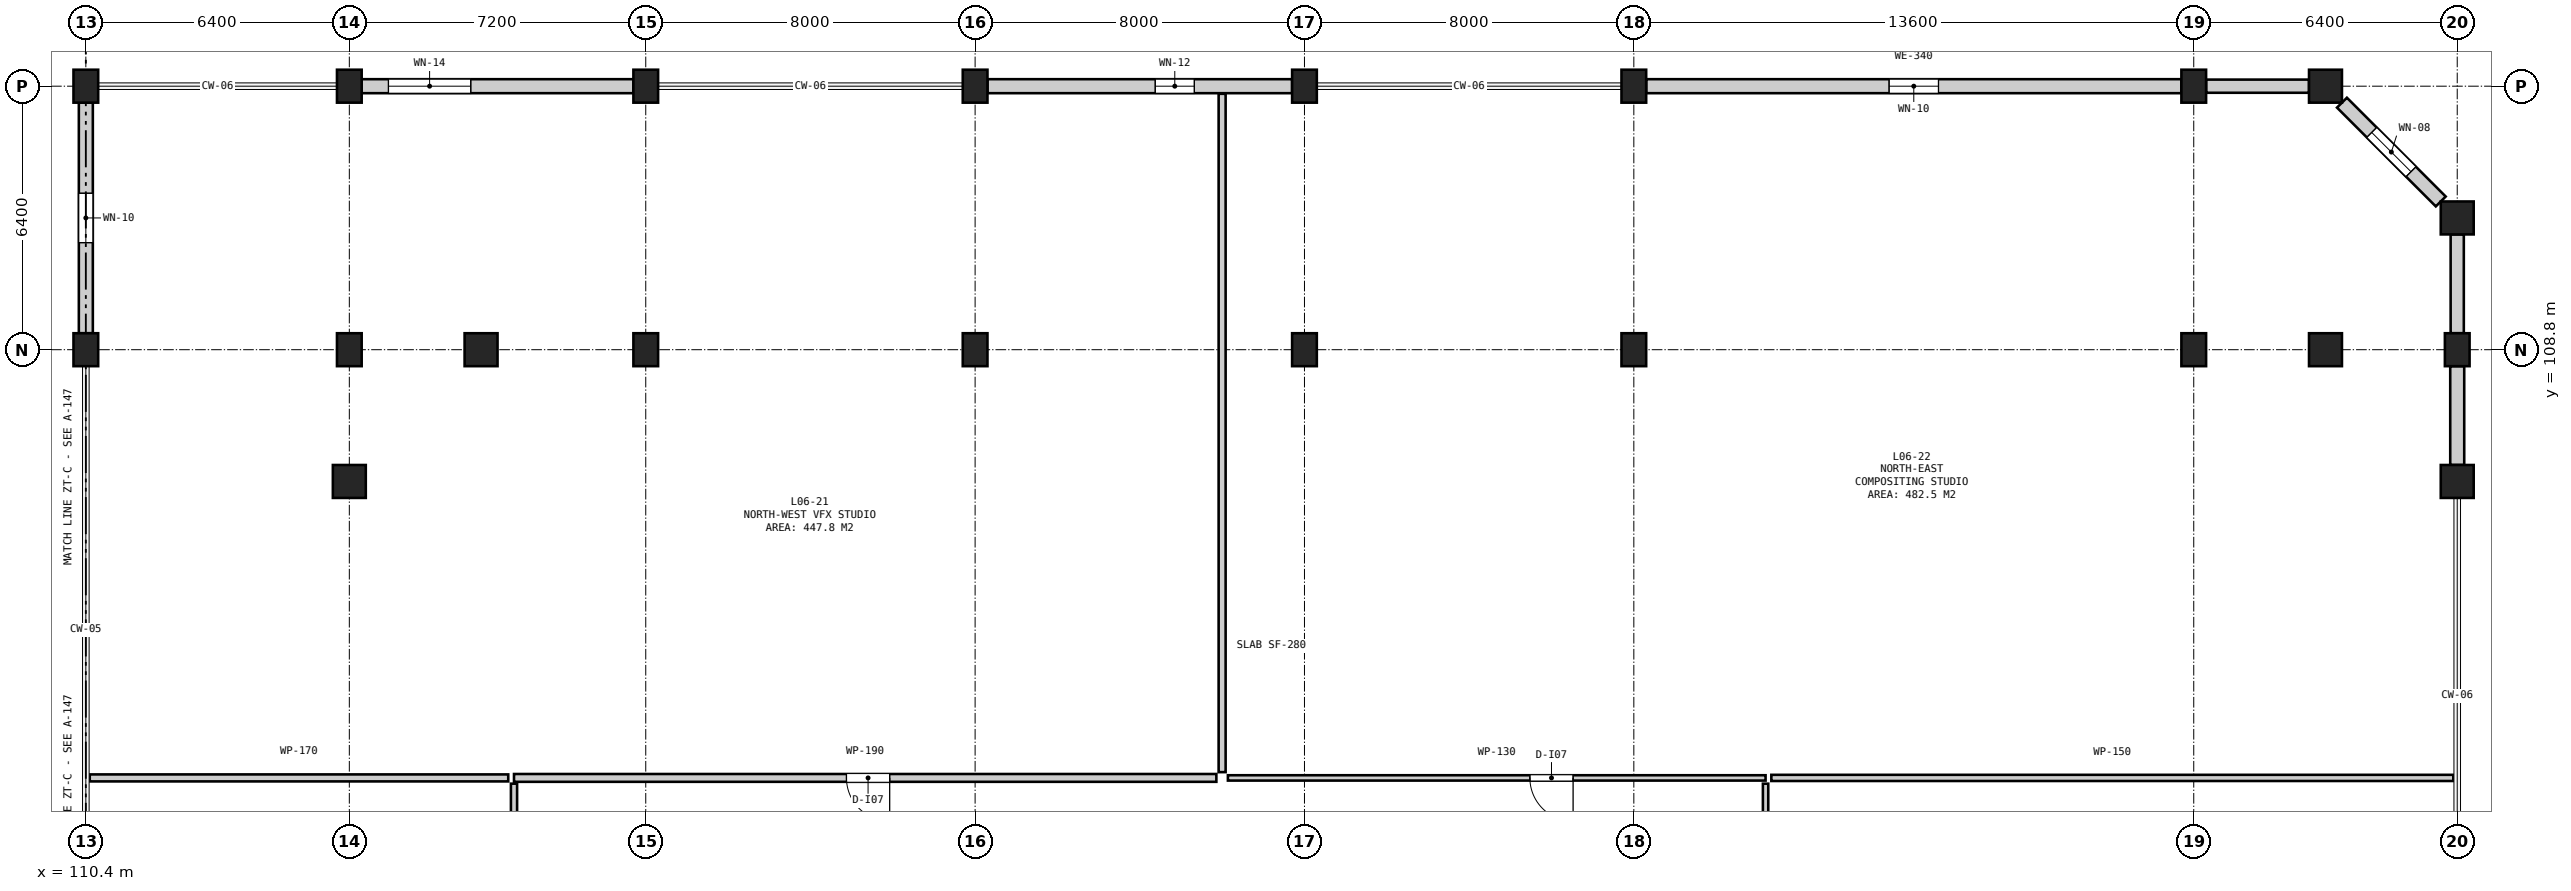
"""IFC4 building model, lengths in metres.
Left out: names, types, materials, properties, quantities, classifications, styles, units other than length and angle.
Written with IfcOpenShell. Run it as: python <this file> out.ifc"""

import sys

from ifc_helpers import new_model, si_unit, direction, frame, frame_2d, origin, origin_2d, place, context, subcontext, project, spatial, rectangle, circle, extrude, element, fill, save


model = new_model("IFC4")
c1 = context("Model", 3, precision=1e-05, world=origin(), true_north=direction((0.0, 1.0)))
c2 = subcontext(c1, "Body", "Model", "MODEL_VIEW")
j1 = project(units=[si_unit("LENGTHUNIT", "METRE"), si_unit("PLANEANGLEUNIT", "RADIAN")], contexts=[c1])
p1 = place(None, origin())
s1 = spatial("IfcSite", under=j1, at=p1, CompositionType="ELEMENT")
p2 = place(p1, origin())
s2 = spatial("IfcBuilding", under=s1, at=p2, CompositionType="ELEMENT")
p3 = place(p2, frame((0.0, 0.0, 27.8)))
s3 = spatial("IfcBuildingStorey", under=s2, at=p3, CompositionType="ELEMENT", Elevation=27.8)
for number, where, z_axis, x_axis in (
    (1, (110.4, 108.8, 0.0), (0.0, 0.0, 1.0), (1.0, 0.0, 0.0)),
    (2, (110.4, 115.2, 0.0), (0.0, 0.0, 1.0), (1.0, 0.0, 0.0)),
):
    element("IfcColumn", number, at=place(p3, frame(where, z_axis=z_axis, x_axis=x_axis)), inside=s3, PredefinedType="COLUMN", context=c2, shape_type="SweptSolid", body=[
        extrude(rectangle(XDim=0.6, YDim=0.8, at=origin_2d()), origin(), (0.0, 0.0, 1.0), 3.9),
    ])
p4 = place(p3, frame((116.8, 105.6, 0.0), z_axis=(0.0, 0.0, 1.0), x_axis=(1.0, 0.0, 0.0)))
e3 = element("IfcColumn", 3, at=p4, inside=s3, PredefinedType="COLUMN", context=c2, shape_type="SweptSolid", body=[
    extrude(circle(Radius=0.4, at=origin_2d()), origin(), (0.0, 0.0, 1.0), 3.9),
])
for number, where, z_axis, x_axis in (
    (4, (116.8, 108.8, 0.0), (0.0, 0.0, 1.0), (1.0, 0.0, 0.0)),
    (5, (116.8, 115.2, 0.0), (0.0, 0.0, 1.0), (1.0, 0.0, 0.0)),
):
    element("IfcColumn", number, at=place(p3, frame(where, z_axis=z_axis, x_axis=x_axis)), inside=s3, PredefinedType="COLUMN", context=c2, shape_type="SweptSolid", body=[
        extrude(rectangle(XDim=0.6, YDim=0.8, at=origin_2d()), origin(), (0.0, 0.0, 1.0), 3.9),
    ])
p5 = place(p3, frame((120.0, 108.8, 0.0), z_axis=(0.0, 0.0, 1.0), x_axis=(1.0, 0.0, 0.0)))
e6 = element("IfcColumn", 6, at=p5, inside=s3, PredefinedType="COLUMN", context=c2, shape_type="SweptSolid", body=[
    extrude(circle(Radius=0.4, at=origin_2d()), origin(), (0.0, 0.0, 1.0), 3.9),
])
for number, where, z_axis, x_axis in (
    (7, (124.0, 108.8, 0.0), (0.0, 0.0, 1.0), (1.0, 0.0, 0.0)),
    (8, (124.0, 115.2, 0.0), (0.0, 0.0, 1.0), (1.0, 0.0, 0.0)),
    (9, (132.0, 108.8, 0.0), (0.0, 0.0, 1.0), (1.0, 0.0, 0.0)),
    (10, (132.0, 115.2, 0.0), (0.0, 0.0, 1.0), (1.0, 0.0, 0.0)),
    (11, (140.0, 108.8, 0.0), (0.0, 0.0, 1.0), (1.0, 0.0, 0.0)),
    (12, (140.0, 115.2, 0.0), (0.0, 0.0, 1.0), (1.0, 0.0, 0.0)),
    (13, (148.0, 108.8, 0.0), (0.0, 0.0, 1.0), (1.0, 0.0, 0.0)),
    (14, (148.0, 115.2, 0.0), (0.0, 0.0, 1.0), (1.0, 0.0, 0.0)),
    (15, (161.6, 108.8, 0.0), (0.0, 0.0, 1.0), (1.0, 0.0, 0.0)),
    (16, (161.6, 115.2, 0.0), (0.0, 0.0, 1.0), (1.0, 0.0, 0.0)),
):
    element("IfcColumn", number, at=place(p3, frame(where, z_axis=z_axis, x_axis=x_axis)), inside=s3, PredefinedType="COLUMN", context=c2, shape_type="SweptSolid", body=[
        extrude(rectangle(XDim=0.6, YDim=0.8, at=origin_2d()), origin(), (0.0, 0.0, 1.0), 3.9),
    ])
for number, where, z_axis, x_axis in (
    (17, (164.8, 108.8, 0.0), (0.0, 0.0, 1.0), (1.0, 0.0, 0.0)),
    (18, (164.8, 115.2, 0.0), (0.0, 0.0, 1.0), (1.0, 0.0, 0.0)),
    (19, (168.0, 105.6, 0.0), (0.0, 0.0, 1.0), (1.0, 0.0, 0.0)),
):
    element("IfcColumn", number, at=place(p3, frame(where, z_axis=z_axis, x_axis=x_axis)), inside=s3, PredefinedType="COLUMN", context=c2, shape_type="SweptSolid", body=[
        extrude(circle(Radius=0.4, at=origin_2d()), origin(), (0.0, 0.0, 1.0), 3.9),
    ])
p6 = place(p3, frame((168.0, 108.8, 0.0), z_axis=(0.0, 0.0, 1.0), x_axis=(1.0, 0.0, 0.0)))
e20 = element("IfcColumn", 20, at=p6, inside=s3, PredefinedType="COLUMN", context=c2, shape_type="SweptSolid", body=[
    extrude(rectangle(XDim=0.6, YDim=0.8, at=origin_2d()), origin(), (0.0, 0.0, 1.0), 3.9),
])
p7 = place(p3, frame((168.0, 112.0, 0.0), z_axis=(0.0, 0.0, 1.0), x_axis=(1.0, 0.0, 0.0)))
e21 = element("IfcColumn", 21, at=p7, inside=s3, PredefinedType="COLUMN", context=c2, shape_type="SweptSolid", body=[
    extrude(circle(Radius=0.4, at=origin_2d()), origin(), (0.0, 0.0, 1.0), 3.9),
])
p8 = place(p3, frame((168.0, 106.0, 0.0), z_axis=(0.0, 0.0, 1.0), x_axis=(0.0, 1.0, 0.0)))
e22 = element("IfcWall", 22, at=p8, inside=s3, PredefinedType="SOLIDWALL", context=c2, shape_type="SweptSolid", body=[
    extrude(rectangle(XDim=2.4, YDim=0.34, at=frame_2d((1.2, 0.0))), origin(), (0.0, 0.0, 1.0), 2.575),
])
p9 = place(p3, frame((168.0, 109.2, 0.0), z_axis=(0.0, 0.0, 1.0), x_axis=(0.0, 1.0, 0.0)))
e23 = element("IfcWall", 23, at=p9, inside=s3, PredefinedType="SOLIDWALL", context=c2, shape_type="SweptSolid", body=[
    extrude(rectangle(XDim=2.4, YDim=0.32, at=frame_2d((1.2, 0.0))), origin(), (0.0, 0.0, 1.0), 3.04),
])
p10 = place(p3, frame((167.6, 112.4, 0.0), z_axis=(0.0, 0.0, 1.0), x_axis=(-0.707106781187, 0.707106781187, 0.0)))
e24 = element("IfcWall", 24, at=p10, inside=s3, PredefinedType="SOLIDWALL", context=c2, shape_type="SweptSolid", body=[
    extrude(rectangle(XDim=3.394, YDim=0.34, at=frame_2d((1.697, 0.0))), origin(), (0.0, 0.0, 1.0), 3.035),
])
p11 = place(p10, frame((1.022, 0.0, 0.9)))
e25 = element("IfcOpeningElement", 25, at=p11, cuts=e24, PredefinedType="OPENING", context=c2, shape_type="SweptSolid", body=[
    extrude(rectangle(XDim=1.35, YDim=1.75, at=frame_2d((0.675, 0.875))), frame((0.0, 0.182, 0.0), z_axis=(0.0, -1.0, 0.0), x_axis=(1.0, 0.0, 0.0)), (0.0, 0.0, 1.0), 0.364),
])
p12 = place(p3, frame((164.4, 115.2, 0.0), z_axis=(0.0, 0.0, 1.0), x_axis=(-1.0, 0.0, 0.0)))
e26 = element("IfcWall", 26, at=p12, inside=s3, PredefinedType="SOLIDWALL", context=c2, shape_type="SweptSolid", body=[
    extrude(rectangle(XDim=2.5, YDim=0.32, at=frame_2d((1.25, 0.0))), origin(), (0.0, 0.0, 1.0), 3.04),
])
p13 = place(p3, frame((161.3, 115.2, 0.0), z_axis=(0.0, 0.0, 1.0), x_axis=(-1.0, 0.0, 0.0)))
e27 = element("IfcWall", 27, at=p13, inside=s3, PredefinedType="SOLIDWALL", context=c2, shape_type="SweptSolid", body=[
    extrude(rectangle(XDim=13.0, YDim=0.34, at=frame_2d((6.5, 0.0))), origin(), (0.0, 0.0, 1.0), 3.025),
])
p14 = place(p13, frame((5.9, 0.0, 0.9)))
e28 = element("IfcOpeningElement", 28, at=p14, cuts=e27, PredefinedType="OPENING", context=c2, shape_type="SweptSolid", body=[
    extrude(rectangle(XDim=1.2, YDim=1.7, at=frame_2d((0.6, 0.85))), frame((0.0, 0.182, 0.0), z_axis=(0.0, -1.0, 0.0), x_axis=(1.0, 0.0, 0.0)), (0.0, 0.0, 1.0), 0.364),
])
p15 = place(p3, frame((139.7, 115.2, 0.0), z_axis=(0.0, 0.0, 1.0), x_axis=(-1.0, 0.0, 0.0)))
e29 = element("IfcWall", 29, at=p15, inside=s3, PredefinedType="SOLIDWALL", context=c2, shape_type="SweptSolid", body=[
    extrude(rectangle(XDim=7.4, YDim=0.34, at=frame_2d((3.7, 0.0))), origin(), (0.0, 0.0, 1.0), 3.04),
])
p16 = place(p15, frame((2.375, 0.0, 0.9)))
e30 = element("IfcOpeningElement", 30, at=p16, cuts=e29, PredefinedType="OPENING", context=c2, shape_type="SweptSolid", body=[
    extrude(rectangle(XDim=0.95, YDim=1.45, at=frame_2d((0.475, 0.725))), frame((0.0, 0.182, 0.0), z_axis=(0.0, -1.0, 0.0), x_axis=(1.0, 0.0, 0.0)), (0.0, 0.0, 1.0), 0.364),
])
p17 = place(p3, frame((123.7, 115.2, 0.0), z_axis=(0.0, 0.0, 1.0), x_axis=(-1.0, 0.0, 0.0)))
e31 = element("IfcWall", 31, at=p17, inside=s3, PredefinedType="SOLIDWALL", context=c2, shape_type="SweptSolid", body=[
    extrude(rectangle(XDim=6.6, YDim=0.34, at=frame_2d((3.3, 0.0))), origin(), (0.0, 0.0, 1.0), 3.025),
])
p18 = place(p17, frame((3.95, 0.0, 0.9)))
e32 = element("IfcOpeningElement", 32, at=p18, cuts=e31, PredefinedType="OPENING", context=c2, shape_type="SweptSolid", body=[
    extrude(rectangle(XDim=2.0, YDim=1.65, at=frame_2d((1.0, 0.825))), frame((0.0, 0.182, 0.0), z_axis=(0.0, -1.0, 0.0), x_axis=(1.0, 0.0, 0.0)), (0.0, 0.0, 1.0), 0.364),
])
p19 = place(p3, frame((110.4, 114.8, 0.0), z_axis=(0.0, 0.0, 1.0), x_axis=(0.0, -1.0, 0.0)))
e33 = element("IfcWall", 33, at=p19, inside=s3, PredefinedType="SOLIDWALL", context=c2, shape_type="SweptSolid", body=[
    extrude(rectangle(XDim=5.6, YDim=0.34, at=frame_2d((2.8, 0.0))), origin(), (0.0, 0.0, 1.0), 3.025),
])
p20 = place(p19, frame((2.2, 0.0, 0.9)))
e34 = element("IfcOpeningElement", 34, at=p20, cuts=e33, PredefinedType="OPENING", context=c2, shape_type="SweptSolid", body=[
    extrude(rectangle(XDim=1.2, YDim=1.7, at=frame_2d((0.6, 0.85))), frame((0.0, 0.182, 0.0), z_axis=(0.0, -1.0, 0.0), x_axis=(1.0, 0.0, 0.0)), (0.0, 0.0, 1.0), 0.364),
])
p21 = place(p3, frame((110.495, 98.4, 0.0), z_axis=(0.0, 0.0, 1.0), x_axis=(1.0, 0.0, 0.0)))
e35 = element("IfcWall", 35, at=p21, inside=s3, PredefinedType="PARTITIONING", context=c2, shape_type="SweptSolid", body=[
    extrude(rectangle(XDim=10.165, YDim=0.17, at=frame_2d((5.083, 0.0))), origin(), (0.0, 0.0, 1.0), 3.62),
])
p22 = place(p3, frame((120.8, 76.14, 0.0), z_axis=(0.0, 0.0, 1.0), x_axis=(0.0, 1.0, 0.0)))
e36 = element("IfcWall", 36, at=p22, inside=s3, PredefinedType="PARTITIONING", context=c2, shape_type="SweptSolid", body=[
    extrude(rectangle(XDim=22.12, YDim=0.15, at=frame_2d((11.06, 0.0))), origin(), (0.0, 0.0, 1.0), 3.62),
])
p23 = place(p22, frame((10.535, 0.0, 0.0)))
e37 = element("IfcOpeningElement", 37, at=p23, cuts=e36, PredefinedType="OPENING", context=c2, shape_type="SweptSolid", body=[
    extrude(rectangle(XDim=1.05, YDim=2.15, at=frame_2d((0.525, 1.075))), frame((0.0, 0.087, 0.0), z_axis=(0.0, -1.0, 0.0), x_axis=(1.0, 0.0, 0.0)), (0.0, 0.0, 1.0), 0.174),
])
p24 = place(p3, frame((151.34, 98.4, 0.0), z_axis=(0.0, 0.0, 1.0), x_axis=(1.0, 0.0, 0.0)))
e38 = element("IfcWall", 38, at=p24, inside=s3, PredefinedType="PARTITIONING", context=c2, shape_type="SweptSolid", body=[
    extrude(rectangle(XDim=16.565, YDim=0.15, at=frame_2d((8.282, 0.0))), origin(), (0.0, 0.0, 1.0), 3.62),
])
p25 = place(p3, frame((151.2, 76.14, 0.0), z_axis=(0.0, 0.0, 1.0), x_axis=(0.0, 1.0, 0.0)))
e39 = element("IfcWall", 39, at=p25, inside=s3, PredefinedType="PARTITIONING", context=c2, shape_type="SweptSolid", body=[
    extrude(rectangle(XDim=22.12, YDim=0.13, at=frame_2d((11.06, 0.0))), origin(), (0.0, 0.0, 1.0), 3.62),
])
p26 = place(p25, frame((10.535, 0.0, 0.0)))
e40 = element("IfcOpeningElement", 40, at=p26, cuts=e39, PredefinedType="OPENING", context=c2, shape_type="SweptSolid", body=[
    extrude(rectangle(XDim=1.05, YDim=2.15, at=frame_2d((0.525, 1.075))), frame((0.0, 0.077, 0.0), z_axis=(0.0, -1.0, 0.0), x_axis=(1.0, 0.0, 0.0)), (0.0, 0.0, 1.0), 0.154),
])
p27 = place(p3, frame((120.8, 98.4, 0.0), z_axis=(0.0, 0.0, 1.0), x_axis=(1.0, 0.0, 0.0)))
e41 = element("IfcWall", 41, at=p27, inside=s3, PredefinedType="PARTITIONING", context=c2, shape_type="SweptSolid", body=[
    extrude(rectangle(XDim=17.06, YDim=0.19, at=frame_2d((8.53, 0.0))), origin(), (0.0, 0.0, 1.0), 3.62),
])
p28 = place(p27, frame((8.075, 0.0, 0.0)))
e42 = element("IfcOpeningElement", 42, at=p28, cuts=e41, PredefinedType="OPENING", context=c2, shape_type="SweptSolid", body=[
    extrude(rectangle(XDim=1.05, YDim=2.15, at=frame_2d((0.525, 1.075))), frame((0.0, 0.107, 0.0), z_axis=(0.0, -1.0, 0.0), x_axis=(1.0, 0.0, 0.0)), (0.0, 0.0, 1.0), 0.214),
])
p29 = place(p3, frame((138.0, 98.54, 0.0), z_axis=(0.0, 0.0, 1.0), x_axis=(0.0, 1.0, 0.0)))
e43 = element("IfcWall", 43, at=p29, inside=s3, PredefinedType="PARTITIONING", context=c2, shape_type="SweptSolid", body=[
    extrude(rectangle(XDim=16.475, YDim=0.17, at=frame_2d((8.237, 0.0))), origin(), (0.0, 0.0, 1.0), 3.62),
])
p30 = place(p3, frame((138.14, 98.4, 0.0), z_axis=(0.0, 0.0, 1.0), x_axis=(1.0, 0.0, 0.0)))
e44 = element("IfcWall", 44, at=p30, inside=s3, PredefinedType="PARTITIONING", context=c2, shape_type="SweptSolid", body=[
    extrude(rectangle(XDim=13.06, YDim=0.13, at=frame_2d((6.53, 0.0))), origin(), (0.0, 0.0, 1.0), 3.62),
])
p31 = place(p30, frame((7.335, 0.0, 0.0)))
e45 = element("IfcOpeningElement", 45, at=p31, cuts=e44, PredefinedType="OPENING", context=c2, shape_type="SweptSolid", body=[
    extrude(rectangle(XDim=1.05, YDim=2.15, at=frame_2d((0.525, 1.075))), frame((0.0, 0.077, 0.0), z_axis=(0.0, -1.0, 0.0), x_axis=(1.0, 0.0, 0.0)), (0.0, 0.0, 1.0), 0.154),
])
p32 = place(p11, origin())
e46 = element("IfcWindow", 46, at=p32, inside=s3, PartitioningType="SINGLE_PANEL", PredefinedType="WINDOW", context=c2, shape_type="SweptSolid", body=[
    extrude(rectangle(XDim=1.35, YDim=1.75, at=frame_2d((0.675, 0.875))), frame((0.0, 0.03, 0.0), z_axis=(0.0, -1.0, 0.0), x_axis=(1.0, 0.0, 0.0)), (0.0, 0.0, 1.0), 0.06),
])
fill(e25, e46)
p33 = place(p14, origin())
e47 = element("IfcWindow", 47, at=p33, inside=s3, PartitioningType="SINGLE_PANEL", PredefinedType="WINDOW", context=c2, shape_type="SweptSolid", body=[
    extrude(rectangle(XDim=1.2, YDim=1.7, at=frame_2d((0.6, 0.85))), frame((0.0, 0.03, 0.0), z_axis=(0.0, -1.0, 0.0), x_axis=(1.0, 0.0, 0.0)), (0.0, 0.0, 1.0), 0.06),
])
fill(e28, e47)
p34 = place(p16, origin())
e48 = element("IfcWindow", 48, at=p34, inside=s3, PartitioningType="SINGLE_PANEL", PredefinedType="WINDOW", context=c2, shape_type="SweptSolid", body=[
    extrude(rectangle(XDim=0.95, YDim=1.45, at=frame_2d((0.475, 0.725))), frame((0.0, 0.03, 0.0), z_axis=(0.0, -1.0, 0.0), x_axis=(1.0, 0.0, 0.0)), (0.0, 0.0, 1.0), 0.06),
])
fill(e30, e48)
p35 = place(p18, origin())
e49 = element("IfcWindow", 49, at=p35, inside=s3, PartitioningType="DOUBLE_PANEL_HORIZONTAL", PredefinedType="WINDOW", context=c2, shape_type="SweptSolid", body=[
    extrude(rectangle(XDim=2.0, YDim=1.65, at=frame_2d((1.0, 0.825))), frame((0.0, 0.03, 0.0), z_axis=(0.0, -1.0, 0.0), x_axis=(1.0, 0.0, 0.0)), (0.0, 0.0, 1.0), 0.06),
])
fill(e32, e49)
p36 = place(p20, origin())
e50 = element("IfcWindow", 50, at=p36, inside=s3, PartitioningType="SINGLE_PANEL", PredefinedType="WINDOW", context=c2, shape_type="SweptSolid", body=[
    extrude(rectangle(XDim=1.2, YDim=1.7, at=frame_2d((0.6, 0.85))), frame((0.0, 0.03, 0.0), z_axis=(0.0, -1.0, 0.0), x_axis=(1.0, 0.0, 0.0)), (0.0, 0.0, 1.0), 0.06),
])
fill(e34, e50)
p37 = place(p28, frame((1.05, 0.0, 0.0), z_axis=(0.0, 0.0, 1.0), x_axis=(-1.0, 0.0, 0.0)))
e51 = element("IfcDoor", 51, at=p37, inside=s3, OperationType="SINGLE_SWING_LEFT", PredefinedType="DOOR", context=c2, shape_type="SweptSolid", body=[
    extrude(rectangle(XDim=1.05, YDim=2.15, at=frame_2d((0.525, 1.075))), frame((0.0, 0.025, 0.0), z_axis=(0.0, -1.0, 0.0), x_axis=(1.0, 0.0, 0.0)), (0.0, 0.0, 1.0), 0.05),
])
fill(e42, e51)
p38 = place(p31, frame((1.05, 0.0, 0.0), z_axis=(0.0, 0.0, 1.0), x_axis=(-1.0, 0.0, 0.0)))
e52 = element("IfcDoor", 52, at=p38, inside=s3, OperationType="SINGLE_SWING_LEFT", PredefinedType="DOOR", context=c2, shape_type="SweptSolid", body=[
    extrude(rectangle(XDim=1.05, YDim=2.15, at=frame_2d((0.525, 1.075))), frame((0.0, 0.025, 0.0), z_axis=(0.0, -1.0, 0.0), x_axis=(1.0, 0.0, 0.0)), (0.0, 0.0, 1.0), 0.05),
])
fill(e45, e52)
save(model, sys.argv[1])
